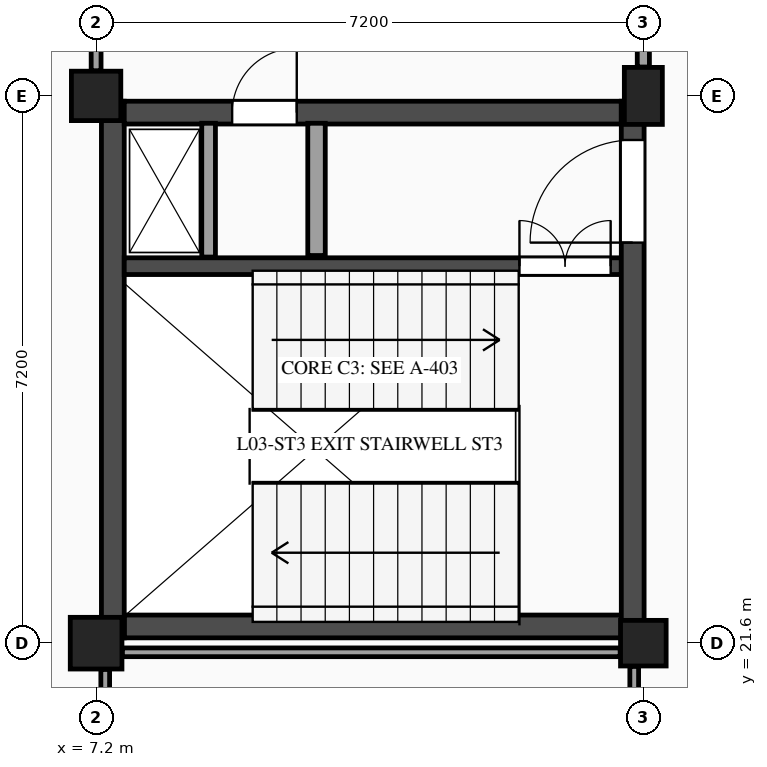
"""IFC4 building model, lengths in metres.
Left out: names, types, materials, properties, quantities, classifications, styles, units other than length and angle.
Written with IfcOpenShell. Run it as: python <this file> out.ifc"""

import sys

from ifc_helpers import new_model, si_unit, direction, frame, frame_2d, origin, origin_2d, place, context, subcontext, project, spatial, rectangle, extrude, element, fill, save


model = new_model("IFC4")
c1 = context("Model", 3, precision=1e-05, world=origin(), true_north=direction((0.0, 1.0)))
c2 = subcontext(c1, "Body", "Model", "MODEL_VIEW")
j1 = project(units=[si_unit("LENGTHUNIT", "METRE"), si_unit("PLANEANGLEUNIT", "RADIAN")], contexts=[c1])
p1 = place(None, origin())
s1 = spatial("IfcSite", under=j1, at=p1, CompositionType="ELEMENT")
p2 = place(p1, origin())
s2 = spatial("IfcBuilding", under=s1, at=p2, CompositionType="ELEMENT")
p3 = place(p2, frame((0.0, 0.0, 14.4)))
s3 = spatial("IfcBuildingStorey", under=s2, at=p3, CompositionType="ELEMENT", Elevation=14.4)
p4 = place(p3, frame((7.2, 21.6, 0.0), z_axis=(0.0, 0.0, 1.0), x_axis=(1.0, 0.0, 0.0)))
e1 = element("IfcColumn", 1, at=p4, inside=s3, PredefinedType="COLUMN", context=c2, shape_type="SweptSolid", body=[
    extrude(rectangle(XDim=0.68, YDim=0.68, at=origin_2d()), origin(), (0.0, 0.0, 1.0), 4.2),
])
p5 = place(p3, frame((7.2, 28.8, 0.0), z_axis=(0.0, 0.0, 1.0), x_axis=(1.0, 0.0, 0.0)))
e2 = element("IfcColumn", 2, at=p5, inside=s3, PredefinedType="COLUMN", context=c2, shape_type="SweptSolid", body=[
    extrude(rectangle(XDim=0.65, YDim=0.65, at=origin_2d()), origin(), (0.0, 0.0, 1.0), 4.2),
])
p6 = place(p3, frame((14.4, 21.6, 0.0), z_axis=(0.0, 0.0, 1.0), x_axis=(1.0, 0.0, 0.0)))
e3 = element("IfcColumn", 3, at=p6, inside=s3, PredefinedType="COLUMN", context=c2, shape_type="SweptSolid", body=[
    extrude(rectangle(XDim=0.6, YDim=0.6, at=origin_2d()), origin(), (0.0, 0.0, 1.0), 4.2),
])
p7 = place(p3, frame((14.4, 28.8, 0.0), z_axis=(0.0, 0.0, 1.0), x_axis=(1.0, 0.0, 0.0)))
e4 = element("IfcColumn", 4, at=p7, inside=s3, PredefinedType="COLUMN", context=c2, shape_type="SweptSolid", body=[
    extrude(rectangle(XDim=0.5, YDim=0.75, at=origin_2d()), origin(), (0.0, 0.0, 1.0), 4.2),
])
p8 = place(p3, frame((7.57, 21.82, 0.0), z_axis=(0.0, 0.0, 1.0), x_axis=(1.0, 0.0, 0.0)))
e5 = element("IfcWall", 5, at=p8, inside=s3, PredefinedType="SHEAR", context=c2, shape_type="SweptSolid", body=[
    extrude(rectangle(XDim=6.54, YDim=0.3, at=frame_2d((3.27, 0.0))), origin(), (0.0, 0.0, 1.0), 3.94),
])
p9 = place(p3, frame((7.42, 28.73, 0.0), z_axis=(0.0, 0.0, 1.0), x_axis=(0.0, -1.0, 0.0)))
e6 = element("IfcWall", 6, at=p9, inside=s3, PredefinedType="SHEAR", context=c2, shape_type="SweptSolid", body=[
    extrude(rectangle(XDim=7.06, YDim=0.3, at=frame_2d((3.53, 0.0))), origin(), (0.0, 0.0, 1.0), 3.94),
])
p10 = place(p3, frame((7.57, 28.58, 0.0), z_axis=(0.0, 0.0, 1.0), x_axis=(1.0, 0.0, 0.0)))
e7 = element("IfcWall", 7, at=p10, inside=s3, PredefinedType="SHEAR", context=c2, shape_type="SweptSolid", body=[
    extrude(rectangle(XDim=6.54, YDim=0.3, at=frame_2d((3.27, 0.0))), origin(), (0.0, 0.0, 1.0), 3.94),
])
p11 = place(p10, frame((1.42, 0.0, 0.0)))
e8 = element("IfcOpeningElement", 8, at=p11, cuts=e7, PredefinedType="OPENING", context=c2, shape_type="SweptSolid", body=[
    extrude(rectangle(XDim=0.85, YDim=2.1, at=frame_2d((0.425, 1.05))), frame((0.0, 0.16, 0.0), z_axis=(0.0, -1.0, 0.0), x_axis=(1.0, 0.0, 0.0)), (0.0, 0.0, 1.0), 0.32),
])
p12 = place(p3, frame((7.57, 26.56, 0.0), z_axis=(0.0, 0.0, 1.0), x_axis=(1.0, 0.0, 0.0)))
e9 = element("IfcWall", 9, at=p12, inside=s3, PredefinedType="SHEAR", context=c2, shape_type="SweptSolid", body=[
    extrude(rectangle(XDim=6.54, YDim=0.22, at=frame_2d((3.27, 0.0))), origin(), (0.0, 0.0, 1.0), 3.94),
])
p13 = place(p12, frame((5.2, 0.0, 0.0)))
e10 = element("IfcOpeningElement", 10, at=p13, cuts=e9, PredefinedType="OPENING", context=c2, shape_type="SweptSolid", body=[
    extrude(rectangle(XDim=1.2, YDim=2.2, at=frame_2d((0.6, 1.1))), frame((0.0, 0.12, 0.0), z_axis=(0.0, -1.0, 0.0), x_axis=(1.0, 0.0, 0.0)), (0.0, 0.0, 1.0), 0.24),
])
p14 = place(p3, frame((10.1, 26.7, 0.0), z_axis=(0.0, 0.0, 1.0), x_axis=(0.0, 1.0, 0.0)))
e11 = element("IfcWall", 11, at=p14, inside=s3, PredefinedType="PARTITIONING", context=c2, shape_type="SweptSolid", body=[
    extrude(rectangle(XDim=1.74, YDim=0.23, at=frame_2d((0.87, 0.0))), origin(), (0.0, 0.0, 1.0), 3.94),
])
p15 = place(p3, frame((8.68, 26.68, 0.0), z_axis=(0.0, 0.0, 1.0), x_axis=(0.0, 1.0, 0.0)))
e12 = element("IfcWall", 12, at=p15, inside=s3, PredefinedType="PARTITIONING", context=c2, shape_type="SweptSolid", body=[
    extrude(rectangle(XDim=1.76, YDim=0.18, at=frame_2d((0.88, 0.0))), origin(), (0.0, 0.0, 1.0), 3.94),
])
p16 = place(p3, frame((14.26, 21.67, 0.0), z_axis=(0.0, 0.0, 1.0), x_axis=(0.0, 1.0, 0.0)))
e13 = element("IfcWall", 13, at=p16, inside=s3, PredefinedType="SHEAR", context=c2, shape_type="SweptSolid", body=[
    extrude(rectangle(XDim=7.06, YDim=0.3, at=frame_2d((3.53, 0.0))), origin(), (0.0, 0.0, 1.0), 3.94),
])
p17 = place(p16, frame((5.2, 0.0, 0.0)))
e14 = element("IfcOpeningElement", 14, at=p17, cuts=e13, PredefinedType="OPENING", context=c2, shape_type="SweptSolid", body=[
    extrude(rectangle(XDim=1.35, YDim=2.15, at=frame_2d((0.675, 1.075))), frame((0.0, 0.16, 0.0), z_axis=(0.0, -1.0, 0.0), x_axis=(1.0, 0.0, 0.0)), (0.0, 0.0, 1.0), 0.32),
])
p18 = place(p3, frame((7.545, 21.48, 0.0), z_axis=(0.0, 0.0, 1.0), x_axis=(1.0, 0.0, 0.0)))
e15 = element("IfcWall", 15, at=p18, inside=s3, PredefinedType="PARTITIONING", context=c2, shape_type="SweptSolid", body=[
    extrude(rectangle(XDim=6.55, YDim=0.115, at=frame_2d((3.275, 0.0))), origin(), (0.0, 0.0, 1.0), 3.22),
])
p19 = place(p3, frame((7.32, 14.725, 0.0), z_axis=(0.0, 0.0, 1.0), x_axis=(0.0, 1.0, 0.0)))
e16 = element("IfcWall", 16, at=p19, inside=s3, PredefinedType="PARTITIONING", context=c2, shape_type="SweptSolid", body=[
    extrude(rectangle(XDim=6.53, YDim=0.115, at=frame_2d((3.265, 0.0))), origin(), (0.0, 0.0, 1.0), 3.245),
])
p20 = place(p3, frame((14.28, 14.715, 0.0), z_axis=(0.0, 0.0, 1.0), x_axis=(0.0, 1.0, 0.0)))
e17 = element("IfcWall", 17, at=p20, inside=s3, PredefinedType="PARTITIONING", context=c2, shape_type="SweptSolid", body=[
    extrude(rectangle(XDim=6.58, YDim=0.115, at=frame_2d((3.29, 0.0))), origin(), (0.0, 0.0, 1.0), 3.245),
])
p21 = place(p20, frame((0.685, 0.0, 0.0)))
e18 = element("IfcOpeningElement", 18, at=p21, cuts=e17, PredefinedType="OPENING", context=c2, shape_type="SweptSolid", body=[
    extrude(rectangle(XDim=0.95, YDim=2.1, at=frame_2d((0.475, 1.05))), frame((0.0, 0.067, 0.0), z_axis=(0.0, -1.0, 0.0), x_axis=(1.0, 0.0, 0.0)), (0.0, 0.0, 1.0), 0.135),
])
p22 = place(p20, frame((2.785, 0.0, 0.0)))
e19 = element("IfcOpeningElement", 19, at=p22, cuts=e17, PredefinedType="OPENING", context=c2, shape_type="SweptSolid", body=[
    extrude(rectangle(XDim=0.95, YDim=2.1, at=frame_2d((0.475, 1.05))), frame((0.0, 0.067, 0.0), z_axis=(0.0, -1.0, 0.0), x_axis=(1.0, 0.0, 0.0)), (0.0, 0.0, 1.0), 0.135),
])
p23 = place(p20, frame((4.935, 0.0, 0.0)))
e20 = element("IfcOpeningElement", 20, at=p23, cuts=e17, PredefinedType="OPENING", context=c2, shape_type="SweptSolid", body=[
    extrude(rectangle(XDim=1.0, YDim=2.15, at=frame_2d((0.5, 1.075))), frame((0.0, 0.067, 0.0), z_axis=(0.0, -1.0, 0.0), x_axis=(1.0, 0.0, 0.0)), (0.0, 0.0, 1.0), 0.135),
])
p24 = place(p3, frame((7.2, 29.13, 0.0), z_axis=(0.0, 0.0, 1.0), x_axis=(0.0, 1.0, 0.0)))
e21 = element("IfcWall", 21, at=p24, inside=s3, PredefinedType="PARTITIONING", context=c2, shape_type="SweptSolid", body=[
    extrude(rectangle(XDim=6.555, YDim=0.13, at=frame_2d((3.278, 0.0))), origin(), (0.0, 0.0, 1.0), 3.305),
])
p25 = place(p24, frame((2.728, 0.0, 0.0)))
e22 = element("IfcOpeningElement", 22, at=p25, cuts=e21, PredefinedType="OPENING", context=c2, shape_type="SweptSolid", body=[
    extrude(rectangle(XDim=1.1, YDim=2.15, at=frame_2d((0.55, 1.075))), frame((0.0, 0.075, 0.0), z_axis=(0.0, -1.0, 0.0), x_axis=(1.0, 0.0, 0.0)), (0.0, 0.0, 1.0), 0.15),
])
p26 = place(p3, frame((14.4, 29.18, 0.0), z_axis=(0.0, 0.0, 1.0), x_axis=(0.0, 1.0, 0.0)))
e23 = element("IfcWall", 23, at=p26, inside=s3, PredefinedType="PARTITIONING", context=c2, shape_type="SweptSolid", body=[
    extrude(rectangle(XDim=6.495, YDim=0.16, at=frame_2d((3.248, 0.0))), origin(), (0.0, 0.0, 1.0), 3.305),
])
p27 = place(p11, origin())
e24 = element("IfcDoor", 24, at=p27, inside=s3, OperationType="SINGLE_SWING_RIGHT", PredefinedType="DOOR", context=c2, shape_type="SweptSolid", body=[
    extrude(rectangle(XDim=0.85, YDim=2.1, at=frame_2d((0.425, 1.05))), frame((0.0, 0.025, 0.0), z_axis=(0.0, -1.0, 0.0), x_axis=(1.0, 0.0, 0.0)), (0.0, 0.0, 1.0), 0.05),
])
fill(e8, e24)
p28 = place(p13, origin())
e25 = element("IfcDoor", 25, at=p28, inside=s3, OperationType="DOUBLE_DOOR_SINGLE_SWING", PredefinedType="DOOR", context=c2, shape_type="SweptSolid", body=[
    extrude(rectangle(XDim=1.2, YDim=2.2, at=frame_2d((0.6, 1.1))), frame((0.0, 0.025, 0.0), z_axis=(0.0, -1.0, 0.0), x_axis=(1.0, 0.0, 0.0)), (0.0, 0.0, 1.0), 0.05),
])
fill(e10, e25)
p29 = place(p17, origin())
e26 = element("IfcDoor", 26, at=p29, inside=s3, OperationType="SINGLE_SWING_LEFT", PredefinedType="DOOR", context=c2, shape_type="SweptSolid", body=[
    extrude(rectangle(XDim=1.35, YDim=2.15, at=frame_2d((0.675, 1.075))), frame((0.0, 0.025, 0.0), z_axis=(0.0, -1.0, 0.0), x_axis=(1.0, 0.0, 0.0)), (0.0, 0.0, 1.0), 0.05),
])
fill(e14, e26)
save(model, sys.argv[1])
